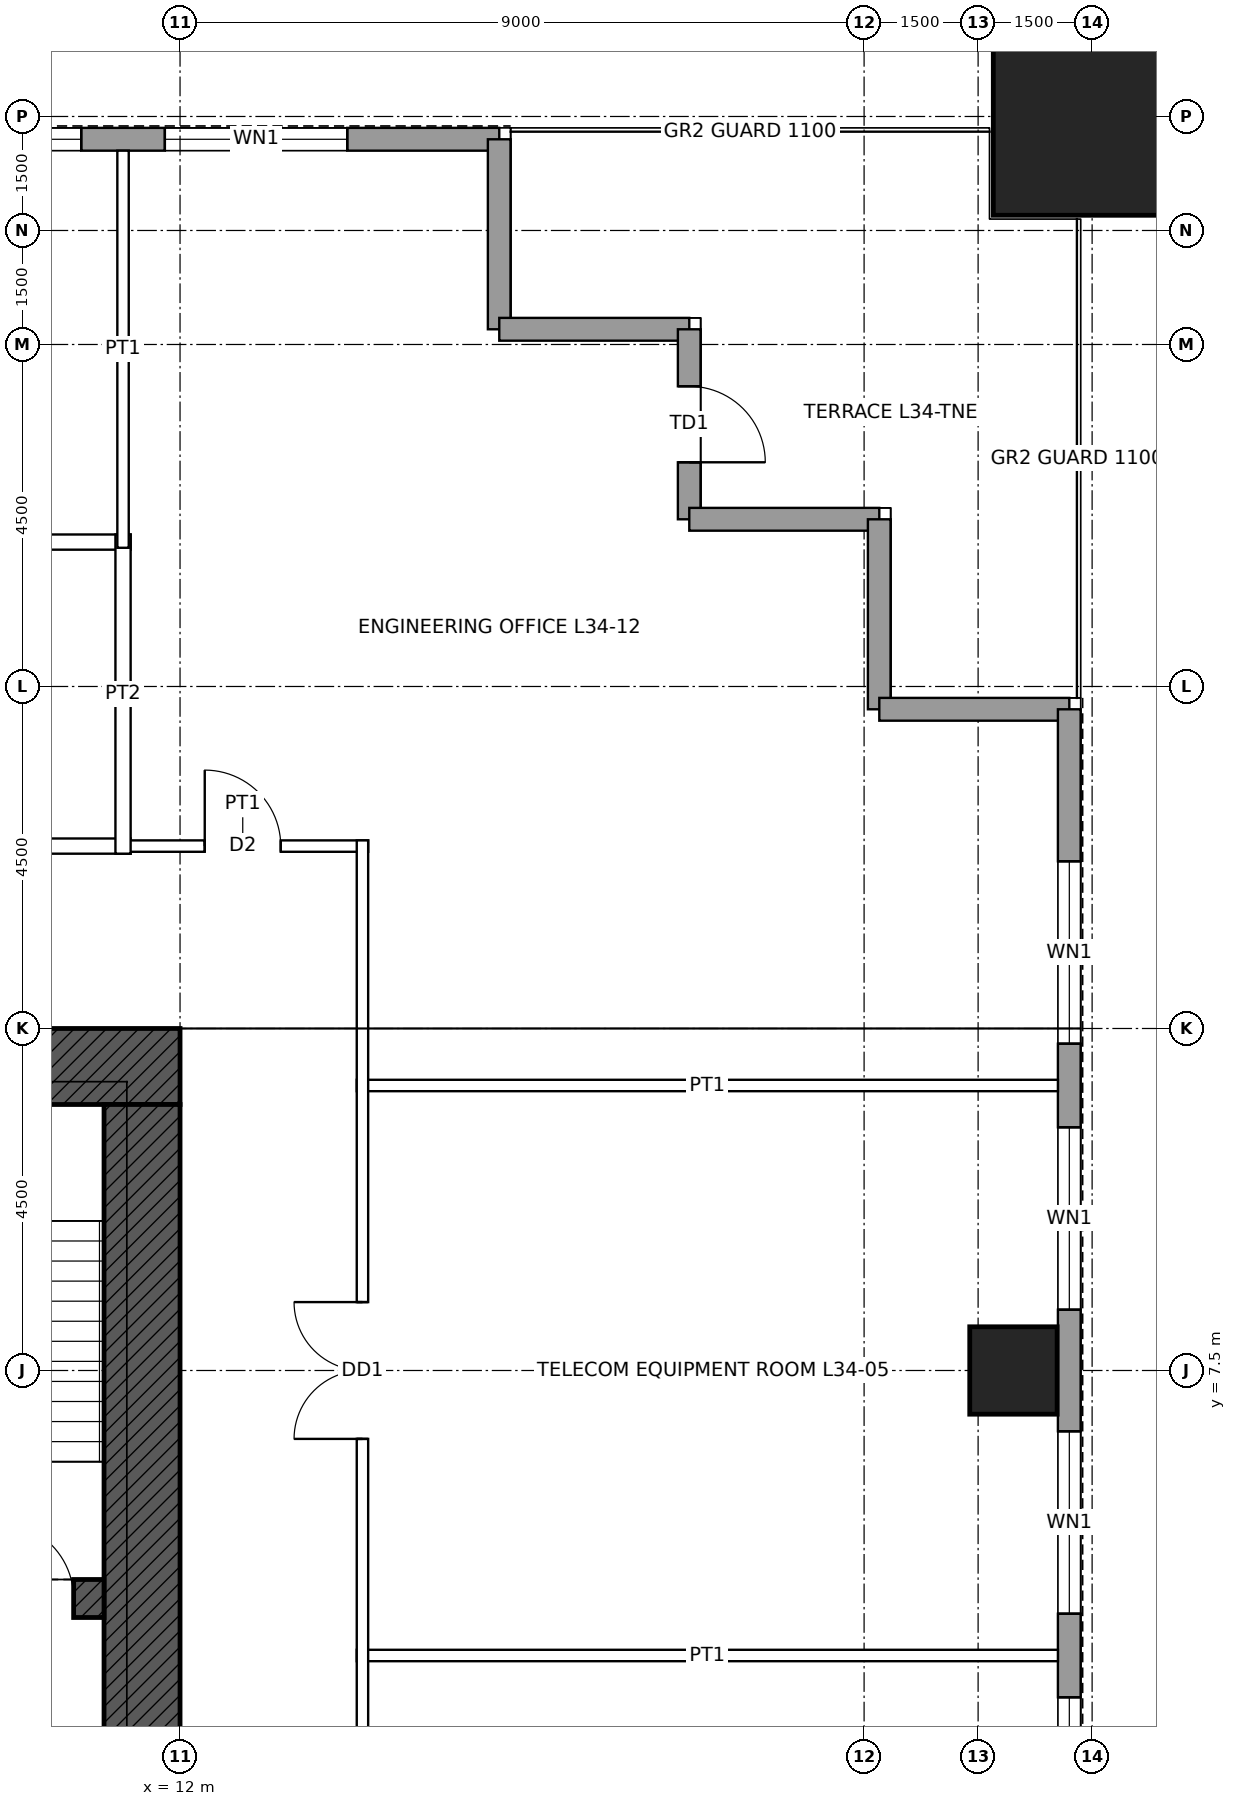
"""IFC4 building model, lengths in metres.
Left out: names, types, materials, properties, quantities, classifications, styles, units other than length and angle.
Written with IfcOpenShell. Run it as: python <this file> out.ifc"""

import sys

from ifc_helpers import new_model, si_unit, direction, frame, frame_2d, origin, origin_2d, place, context, subcontext, project, spatial, rectangle, hollow_rectangle, extrude, element, fill, save


model = new_model("IFC4")
c1 = context("Model", 3, precision=1e-05, world=origin(), true_north=direction((0.0, 1.0)))
c2 = subcontext(c1, "Body", "Model", "MODEL_VIEW")
j1 = project(units=[si_unit("LENGTHUNIT", "METRE"), si_unit("PLANEANGLEUNIT", "RADIAN")], contexts=[c1])
p1 = place(None, origin())
s1 = spatial("IfcSite", under=j1, at=p1, CompositionType="ELEMENT")
p2 = place(p1, origin())
s2 = spatial("IfcBuilding", under=s1, at=p2, CompositionType="ELEMENT")
p3 = place(p2, frame((0.0, 0.0, 167.4)))
s3 = spatial("IfcBuildingStorey", under=s2, at=p3, CompositionType="ELEMENT", Elevation=167.4)
p4 = place(p3, frame((24.0, 24.0, 0.0), z_axis=(0.0, 0.0, 1.0), x_axis=(1.0, 0.0, 0.0)))
e1 = element("IfcColumn", 1, at=p4, inside=s3, PredefinedType="COLUMN", context=c2, shape_type="SweptSolid", body=[
    extrude(hollow_rectangle(XDim=2.6, YDim=2.6, WallThickness=0.13, at=origin_2d()), origin(), (0.0, 0.0, 1.0), 4.5),
])
p5 = place(p3, frame((22.965, 7.5, 0.0), z_axis=(0.0, 0.0, 1.0), x_axis=(1.0, 0.0, 0.0)))
e2 = element("IfcColumn", 2, at=p5, inside=s3, PredefinedType="COLUMN", context=c2, shape_type="SweptSolid", body=[
    extrude(hollow_rectangle(XDim=1.15, YDim=1.15, WallThickness=0.075, at=origin_2d()), origin(), (0.0, 0.0, 1.0), 4.5),
])
p6 = place(p3, frame((-12.0, 11.5, 0.0), z_axis=(0.0, 0.0, 1.0), x_axis=(1.0, 0.0, 0.0)))
e3 = element("IfcWall", 3, at=p6, inside=s3, PredefinedType="SHEAR", context=c2, shape_type="SweptSolid", body=[
    extrude(rectangle(XDim=24.0, YDim=1.0, at=frame_2d((12.0, 0.0))), origin(), (0.0, 0.0, 1.0), 4.5),
])
p7 = place(p6, frame((6.25, 0.0, 0.0)))
e4 = element("IfcOpeningElement", 4, at=p7, cuts=e3, PredefinedType="OPENING", context=c2, shape_type="SweptSolid", body=[
    extrude(rectangle(XDim=1.0, YDim=2.4, at=frame_2d((0.5, 1.2))), frame((0.0, 0.51, 0.0), z_axis=(0.0, -1.0, 0.0), x_axis=(1.0, 0.0, 0.0)), (0.0, 0.0, 1.0), 1.02),
])
p8 = place(p6, frame((16.75, 0.0, 0.0)))
e5 = element("IfcOpeningElement", 5, at=p8, cuts=e3, PredefinedType="OPENING", context=c2, shape_type="SweptSolid", body=[
    extrude(rectangle(XDim=1.0, YDim=2.4, at=frame_2d((0.5, 1.2))), frame((0.0, 0.51, 0.0), z_axis=(0.0, -1.0, 0.0), x_axis=(1.0, 0.0, 0.0)), (0.0, 0.0, 1.0), 1.02),
])
p9 = place(p3, frame((11.5, 11.0, 0.0), z_axis=(0.0, 0.0, 1.0), x_axis=(0.0, -1.0, 0.0)))
e6 = element("IfcWall", 6, at=p9, inside=s3, PredefinedType="SHEAR", context=c2, shape_type="SweptSolid", body=[
    extrude(rectangle(XDim=22.0, YDim=1.0, at=frame_2d((11.0, 0.0))), origin(), (0.0, 0.0, 1.0), 4.5),
])
p10 = place(p9, frame((10.5, 0.0, 0.0)))
e7 = element("IfcOpeningElement", 7, at=p10, cuts=e6, PredefinedType="OPENING", context=c2, shape_type="SweptSolid", body=[
    extrude(rectangle(XDim=1.0, YDim=2.4, at=frame_2d((0.5, 1.2))), frame((0.0, 0.51, 0.0), z_axis=(0.0, -1.0, 0.0), x_axis=(1.0, 0.0, 0.0)), (0.0, 0.0, 1.0), 1.02),
])
p11 = place(p3, frame((-11.0, 4.5, 0.0), z_axis=(0.0, 0.0, 1.0), x_axis=(1.0, 0.0, 0.0)))
e8 = element("IfcWall", 8, at=p11, inside=s3, PredefinedType="SHEAR", context=c2, shape_type="SweptSolid", body=[
    extrude(rectangle(XDim=22.0, YDim=0.5, at=frame_2d((11.0, 0.0))), origin(), (0.0, 0.0, 1.0), 4.5),
])
p12 = place(p11, frame((0.4, 0.0, 0.0)))
e9 = element("IfcOpeningElement", 9, at=p12, cuts=e8, PredefinedType="OPENING", context=c2, shape_type="SweptSolid", body=[
    extrude(rectangle(XDim=1.0, YDim=2.1, at=frame_2d((0.5, 1.05))), frame((0.0, 0.26, 0.0), z_axis=(0.0, -1.0, 0.0), x_axis=(1.0, 0.0, 0.0)), (0.0, 0.0, 1.0), 0.52),
])
p13 = place(p11, frame((20.6, 0.0, 0.0)))
e10 = element("IfcOpeningElement", 10, at=p13, cuts=e8, PredefinedType="OPENING", context=c2, shape_type="SweptSolid", body=[
    extrude(rectangle(XDim=1.0, YDim=2.1, at=frame_2d((0.5, 1.05))), frame((0.0, 0.26, 0.0), z_axis=(0.0, -1.0, 0.0), x_axis=(1.0, 0.0, 0.0)), (0.0, 0.0, 1.0), 0.52),
])
p14 = place(p3, frame((-16.2, 23.7, 0.0), z_axis=(0.0, 0.0, 1.0), x_axis=(1.0, 0.0, 0.0)))
e11 = element("IfcWall", 11, at=p14, inside=s3, PredefinedType="SOLIDWALL", context=c2, shape_type="SweptSolid", body=[
    extrude(rectangle(XDim=32.4, YDim=0.3, at=frame_2d((16.2, 0.0))), origin(), (0.0, 0.0, 1.0), 4.25),
])
p15 = place(p14, frame((2.0, 0.0, 1.0)))
e12 = element("IfcOpeningElement", 12, at=p15, cuts=e11, PredefinedType="OPENING", context=c2, shape_type="SweptSolid", body=[
    extrude(rectangle(XDim=2.4, YDim=1.2, at=frame_2d((1.2, 0.6))), frame((0.0, 0.16, 0.0), z_axis=(0.0, -1.0, 0.0), x_axis=(1.0, 0.0, 0.0)), (0.0, 0.0, 1.0), 0.32),
])
p16 = place(p14, frame((5.5, 0.0, 1.0)))
e13 = element("IfcOpeningElement", 13, at=p16, cuts=e11, PredefinedType="OPENING", context=c2, shape_type="SweptSolid", body=[
    extrude(rectangle(XDim=2.4, YDim=1.2, at=frame_2d((1.2, 0.6))), frame((0.0, 0.16, 0.0), z_axis=(0.0, -1.0, 0.0), x_axis=(1.0, 0.0, 0.0)), (0.0, 0.0, 1.0), 0.32),
])
p17 = place(p14, frame((9.5, 0.0, 1.0)))
e14 = element("IfcOpeningElement", 14, at=p17, cuts=e11, PredefinedType="OPENING", context=c2, shape_type="SweptSolid", body=[
    extrude(rectangle(XDim=2.4, YDim=1.2, at=frame_2d((1.2, 0.6))), frame((0.0, 0.16, 0.0), z_axis=(0.0, -1.0, 0.0), x_axis=(1.0, 0.0, 0.0)), (0.0, 0.0, 1.0), 0.32),
])
p18 = place(p14, frame((13.0, 0.0, 1.0)))
e15 = element("IfcOpeningElement", 15, at=p18, cuts=e11, PredefinedType="OPENING", context=c2, shape_type="SweptSolid", body=[
    extrude(rectangle(XDim=2.4, YDim=1.2, at=frame_2d((1.2, 0.6))), frame((0.0, 0.16, 0.0), z_axis=(0.0, -1.0, 0.0), x_axis=(1.0, 0.0, 0.0)), (0.0, 0.0, 1.0), 0.32),
])
p19 = place(p14, frame((17.0, 0.0, 1.0)))
e16 = element("IfcOpeningElement", 16, at=p19, cuts=e11, PredefinedType="OPENING", context=c2, shape_type="SweptSolid", body=[
    extrude(rectangle(XDim=2.4, YDim=1.2, at=frame_2d((1.2, 0.6))), frame((0.0, 0.16, 0.0), z_axis=(0.0, -1.0, 0.0), x_axis=(1.0, 0.0, 0.0)), (0.0, 0.0, 1.0), 0.32),
])
p20 = place(p14, frame((20.5, 0.0, 1.0)))
e17 = element("IfcOpeningElement", 17, at=p20, cuts=e11, PredefinedType="OPENING", context=c2, shape_type="SweptSolid", body=[
    extrude(rectangle(XDim=2.4, YDim=1.2, at=frame_2d((1.2, 0.6))), frame((0.0, 0.16, 0.0), z_axis=(0.0, -1.0, 0.0), x_axis=(1.0, 0.0, 0.0)), (0.0, 0.0, 1.0), 0.32),
])
p21 = place(p14, frame((24.5, 0.0, 1.0)))
e18 = element("IfcOpeningElement", 18, at=p21, cuts=e11, PredefinedType="OPENING", context=c2, shape_type="SweptSolid", body=[
    extrude(rectangle(XDim=2.4, YDim=1.2, at=frame_2d((1.2, 0.6))), frame((0.0, 0.16, 0.0), z_axis=(0.0, -1.0, 0.0), x_axis=(1.0, 0.0, 0.0)), (0.0, 0.0, 1.0), 0.32),
])
p22 = place(p14, frame((28.0, 0.0, 1.0)))
e19 = element("IfcOpeningElement", 19, at=p22, cuts=e11, PredefinedType="OPENING", context=c2, shape_type="SweptSolid", body=[
    extrude(rectangle(XDim=2.4, YDim=1.2, at=frame_2d((1.2, 0.6))), frame((0.0, 0.16, 0.0), z_axis=(0.0, -1.0, 0.0), x_axis=(1.0, 0.0, 0.0)), (0.0, 0.0, 1.0), 0.32),
])
for number, where, z_axis, x_axis in (
    (20, (16.2, 23.7, 0.0), (0.0, 0.0, 1.0), (0.0, -1.0, 0.0)),
    (21, (16.2, 21.2, 0.0), (0.0, 0.0, 1.0), (1.0, 0.0, 0.0)),
):
    element("IfcWall", number, at=place(p3, frame(where, z_axis=z_axis, x_axis=x_axis)), inside=s3, PredefinedType="SOLIDWALL", context=c2, shape_type="SweptSolid", body=[
        extrude(rectangle(XDim=2.5, YDim=0.3, at=frame_2d((1.25, 0.0))), origin(), (0.0, 0.0, 1.0), 4.25),
    ])
p23 = place(p3, frame((18.7, 21.2, 0.0), z_axis=(0.0, 0.0, 1.0), x_axis=(0.0, -1.0, 0.0)))
e22 = element("IfcWall", 22, at=p23, inside=s3, PredefinedType="SOLIDWALL", context=c2, shape_type="SweptSolid", body=[
    extrude(rectangle(XDim=2.5, YDim=0.3, at=frame_2d((1.25, 0.0))), origin(), (0.0, 0.0, 1.0), 4.25),
])
p24 = place(p23, frame((0.75, 0.0, 0.0)))
e23 = element("IfcOpeningElement", 23, at=p24, cuts=e22, PredefinedType="OPENING", context=c2, shape_type="SweptSolid", body=[
    extrude(rectangle(XDim=1.0, YDim=2.4, at=frame_2d((0.5, 1.2))), frame((0.0, 0.16, 0.0), z_axis=(0.0, -1.0, 0.0), x_axis=(1.0, 0.0, 0.0)), (0.0, 0.0, 1.0), 0.32),
])
for number, where, z_axis, x_axis in (
    (24, (18.7, 18.7, 0.0), (0.0, 0.0, 1.0), (1.0, 0.0, 0.0)),
    (25, (21.2, 18.7, 0.0), (0.0, 0.0, 1.0), (0.0, -1.0, 0.0)),
    (26, (21.2, 16.2, 0.0), (0.0, 0.0, 1.0), (1.0, 0.0, 0.0)),
):
    element("IfcWall", number, at=place(p3, frame(where, z_axis=z_axis, x_axis=x_axis)), inside=s3, PredefinedType="SOLIDWALL", context=c2, shape_type="SweptSolid", body=[
        extrude(rectangle(XDim=2.5, YDim=0.3, at=frame_2d((1.25, 0.0))), origin(), (0.0, 0.0, 1.0), 4.25),
    ])
p25 = place(p3, frame((23.7, 16.2, 0.0), z_axis=(0.0, 0.0, 1.0), x_axis=(0.0, -1.0, 0.0)))
e27 = element("IfcWall", 27, at=p25, inside=s3, PredefinedType="SOLIDWALL", context=c2, shape_type="SweptSolid", body=[
    extrude(rectangle(XDim=32.4, YDim=0.3, at=frame_2d((16.2, 0.0))), origin(), (0.0, 0.0, 1.0), 4.25),
])
p26 = place(p25, frame((2.0, 0.0, 1.0)))
e28 = element("IfcOpeningElement", 28, at=p26, cuts=e27, PredefinedType="OPENING", context=c2, shape_type="SweptSolid", body=[
    extrude(rectangle(XDim=2.4, YDim=1.2, at=frame_2d((1.2, 0.6))), frame((0.0, 0.16, 0.0), z_axis=(0.0, -1.0, 0.0), x_axis=(1.0, 0.0, 0.0)), (0.0, 0.0, 1.0), 0.32),
])
p27 = place(p25, frame((5.5, 0.0, 1.0)))
e29 = element("IfcOpeningElement", 29, at=p27, cuts=e27, PredefinedType="OPENING", context=c2, shape_type="SweptSolid", body=[
    extrude(rectangle(XDim=2.4, YDim=1.2, at=frame_2d((1.2, 0.6))), frame((0.0, 0.16, 0.0), z_axis=(0.0, -1.0, 0.0), x_axis=(1.0, 0.0, 0.0)), (0.0, 0.0, 1.0), 0.32),
])
p28 = place(p25, frame((9.5, 0.0, 1.0)))
e30 = element("IfcOpeningElement", 30, at=p28, cuts=e27, PredefinedType="OPENING", context=c2, shape_type="SweptSolid", body=[
    extrude(rectangle(XDim=2.4, YDim=1.2, at=frame_2d((1.2, 0.6))), frame((0.0, 0.16, 0.0), z_axis=(0.0, -1.0, 0.0), x_axis=(1.0, 0.0, 0.0)), (0.0, 0.0, 1.0), 0.32),
])
p29 = place(p25, frame((13.0, 0.0, 1.0)))
e31 = element("IfcOpeningElement", 31, at=p29, cuts=e27, PredefinedType="OPENING", context=c2, shape_type="SweptSolid", body=[
    extrude(rectangle(XDim=2.4, YDim=1.2, at=frame_2d((1.2, 0.6))), frame((0.0, 0.16, 0.0), z_axis=(0.0, -1.0, 0.0), x_axis=(1.0, 0.0, 0.0)), (0.0, 0.0, 1.0), 0.32),
])
p30 = place(p25, frame((17.0, 0.0, 1.0)))
e32 = element("IfcOpeningElement", 32, at=p30, cuts=e27, PredefinedType="OPENING", context=c2, shape_type="SweptSolid", body=[
    extrude(rectangle(XDim=2.4, YDim=1.2, at=frame_2d((1.2, 0.6))), frame((0.0, 0.16, 0.0), z_axis=(0.0, -1.0, 0.0), x_axis=(1.0, 0.0, 0.0)), (0.0, 0.0, 1.0), 0.32),
])
p31 = place(p25, frame((20.5, 0.0, 1.0)))
e33 = element("IfcOpeningElement", 33, at=p31, cuts=e27, PredefinedType="OPENING", context=c2, shape_type="SweptSolid", body=[
    extrude(rectangle(XDim=2.4, YDim=1.2, at=frame_2d((1.2, 0.6))), frame((0.0, 0.16, 0.0), z_axis=(0.0, -1.0, 0.0), x_axis=(1.0, 0.0, 0.0)), (0.0, 0.0, 1.0), 0.32),
])
p32 = place(p25, frame((24.5, 0.0, 1.0)))
e34 = element("IfcOpeningElement", 34, at=p32, cuts=e27, PredefinedType="OPENING", context=c2, shape_type="SweptSolid", body=[
    extrude(rectangle(XDim=2.4, YDim=1.2, at=frame_2d((1.2, 0.6))), frame((0.0, 0.16, 0.0), z_axis=(0.0, -1.0, 0.0), x_axis=(1.0, 0.0, 0.0)), (0.0, 0.0, 1.0), 0.32),
])
p33 = place(p25, frame((28.0, 0.0, 1.0)))
e35 = element("IfcOpeningElement", 35, at=p33, cuts=e27, PredefinedType="OPENING", context=c2, shape_type="SweptSolid", body=[
    extrude(rectangle(XDim=2.4, YDim=1.2, at=frame_2d((1.2, 0.6))), frame((0.0, 0.16, 0.0), z_axis=(0.0, -1.0, 0.0), x_axis=(1.0, 0.0, 0.0)), (0.0, 0.0, 1.0), 0.32),
])
for number, where, z_axis, x_axis in (
    (36, (14.325, 3.75, 0.0), (0.0, 0.0, 1.0), (1.0, 0.0, 0.0)),
    (37, (14.325, 11.25, 0.0), (0.0, 0.0, 1.0), (1.0, 0.0, 0.0)),
):
    element("IfcWall", number, at=place(p3, frame(where, z_axis=z_axis, x_axis=x_axis)), inside=s3, PredefinedType="PARTITIONING", context=c2, shape_type="SweptSolid", body=[
        extrude(rectangle(XDim=9.225, YDim=0.15, at=frame_2d((4.613, 0.0))), origin(), (0.0, 0.0, 1.0), 3.409),
    ])
p34 = place(p3, frame((3.65, 14.4, 0.0), z_axis=(0.0, 0.0, 1.0), x_axis=(1.0, 0.0, 0.0)))
e38 = element("IfcWall", 38, at=p34, inside=s3, PredefinedType="PARTITIONING", context=c2, shape_type="SweptSolid", body=[
    extrude(rectangle(XDim=7.7, YDim=0.2, at=frame_2d((3.85, 0.0))), origin(), (0.0, 0.0, 1.0), 4.25),
])
p35 = place(p3, frame((11.175, 14.4, 0.0), z_axis=(0.0, 0.0, 1.0), x_axis=(1.0, 0.0, 0.0)))
e39 = element("IfcWall", 39, at=p35, inside=s3, PredefinedType="PARTITIONING", context=c2, shape_type="SweptSolid", body=[
    extrude(rectangle(XDim=3.3, YDim=0.15, at=frame_2d((1.65, 0.0))), origin(), (0.0, 0.0, 1.0), 4.25),
])
p36 = place(p35, frame((1.15, 0.0, 0.0)))
e40 = element("IfcOpeningElement", 40, at=p36, cuts=e39, PredefinedType="OPENING", context=c2, shape_type="SweptSolid", body=[
    extrude(rectangle(XDim=1.0, YDim=2.1, at=frame_2d((0.5, 1.05))), frame((0.0, 0.085, 0.0), z_axis=(0.0, -1.0, 0.0), x_axis=(1.0, 0.0, 0.0)), (0.0, 0.0, 1.0), 0.17),
])
p37 = place(p3, frame((3.65, 18.4, 0.0), z_axis=(0.0, 0.0, 1.0), x_axis=(1.0, 0.0, 0.0)))
e41 = element("IfcWall", 41, at=p37, inside=s3, PredefinedType="PARTITIONING", context=c2, shape_type="SweptSolid", body=[
    extrude(rectangle(XDim=7.7, YDim=0.2, at=frame_2d((3.85, 0.0))), origin(), (0.0, 0.0, 1.0), 4.25),
])
p38 = place(p3, frame((11.25, 14.3, 0.0), z_axis=(0.0, 0.0, 1.0), x_axis=(0.0, 1.0, 0.0)))
e42 = element("IfcWall", 42, at=p38, inside=s3, PredefinedType="PARTITIONING", context=c2, shape_type="SweptSolid", body=[
    extrude(rectangle(XDim=4.2, YDim=0.2, at=frame_2d((2.1, 0.0))), origin(), (0.0, 0.0, 1.0), 3.409),
])
p39 = place(p3, frame((11.25, 18.325, 0.0), z_axis=(0.0, 0.0, 1.0), x_axis=(0.0, 1.0, 0.0)))
e43 = element("IfcWall", 43, at=p39, inside=s3, PredefinedType="PARTITIONING", context=c2, shape_type="SweptSolid", body=[
    extrude(rectangle(XDim=5.225, YDim=0.15, at=frame_2d((2.613, 0.0))), origin(), (0.0, 0.0, 1.0), 3.409),
])
p40 = place(p3, frame((14.4, -14.475, 0.0), z_axis=(0.0, 0.0, 1.0), x_axis=(0.0, 1.0, 0.0)))
e44 = element("IfcWall", 44, at=p40, inside=s3, PredefinedType="PARTITIONING", context=c2, shape_type="SweptSolid", body=[
    extrude(rectangle(XDim=28.95, YDim=0.15, at=frame_2d((14.475, 0.0))), origin(), (0.0, 0.0, 1.0), 4.25),
])
p41 = place(p40, frame((21.075, 0.0, 0.0)))
e45 = element("IfcOpeningElement", 45, at=p41, cuts=e44, PredefinedType="OPENING", context=c2, shape_type="SweptSolid", body=[
    extrude(rectangle(XDim=1.8, YDim=2.4, at=frame_2d((0.9, 1.2))), frame((0.0, 0.085, 0.0), z_axis=(0.0, -1.0, 0.0), x_axis=(1.0, 0.0, 0.0)), (0.0, 0.0, 1.0), 0.17),
])
p42 = place(p40, frame((9.825, 0.0, 0.0)))
e46 = element("IfcOpeningElement", 46, at=p42, cuts=e44, PredefinedType="OPENING", context=c2, shape_type="SweptSolid", body=[
    extrude(rectangle(XDim=1.8, YDim=2.4, at=frame_2d((0.9, 1.2))), frame((0.0, 0.085, 0.0), z_axis=(0.0, -1.0, 0.0), x_axis=(1.0, 0.0, 0.0)), (0.0, 0.0, 1.0), 0.17),
])
p43 = place(p21, origin())
e47 = element("IfcWindow", 47, at=p43, inside=s3, PartitioningType="SINGLE_PANEL", PredefinedType="WINDOW", context=c2, shape_type="SweptSolid", body=[
    extrude(rectangle(XDim=2.4, YDim=1.2, at=frame_2d((1.2, 0.6))), frame((0.0, 0.03, 0.0), z_axis=(0.0, -1.0, 0.0), x_axis=(1.0, 0.0, 0.0)), (0.0, 0.0, 1.0), 0.06),
])
fill(e18, e47)
p44 = place(p22, origin())
e48 = element("IfcWindow", 48, at=p44, inside=s3, PartitioningType="SINGLE_PANEL", PredefinedType="WINDOW", context=c2, shape_type="SweptSolid", body=[
    extrude(rectangle(XDim=2.4, YDim=1.2, at=frame_2d((1.2, 0.6))), frame((0.0, 0.03, 0.0), z_axis=(0.0, -1.0, 0.0), x_axis=(1.0, 0.0, 0.0)), (0.0, 0.0, 1.0), 0.06),
])
fill(e19, e48)
p45 = place(p24, origin())
e49 = element("IfcDoor", 49, at=p45, inside=s3, OperationType="SINGLE_SWING_RIGHT", PredefinedType="DOOR", context=c2, shape_type="SweptSolid", body=[
    extrude(rectangle(XDim=1.0, YDim=2.4, at=frame_2d((0.5, 1.2))), frame((0.0, 0.025, 0.0), z_axis=(0.0, -1.0, 0.0), x_axis=(1.0, 0.0, 0.0)), (0.0, 0.0, 1.0), 0.05),
])
fill(e23, e49)
p46 = place(p26, origin())
e50 = element("IfcWindow", 50, at=p46, inside=s3, PartitioningType="SINGLE_PANEL", PredefinedType="WINDOW", context=c2, shape_type="SweptSolid", body=[
    extrude(rectangle(XDim=2.4, YDim=1.2, at=frame_2d((1.2, 0.6))), frame((0.0, 0.03, 0.0), z_axis=(0.0, -1.0, 0.0), x_axis=(1.0, 0.0, 0.0)), (0.0, 0.0, 1.0), 0.06),
])
fill(e28, e50)
p47 = place(p27, origin())
e51 = element("IfcWindow", 51, at=p47, inside=s3, PartitioningType="SINGLE_PANEL", PredefinedType="WINDOW", context=c2, shape_type="SweptSolid", body=[
    extrude(rectangle(XDim=2.4, YDim=1.2, at=frame_2d((1.2, 0.6))), frame((0.0, 0.03, 0.0), z_axis=(0.0, -1.0, 0.0), x_axis=(1.0, 0.0, 0.0)), (0.0, 0.0, 1.0), 0.06),
])
fill(e29, e51)
p48 = place(p28, origin())
e52 = element("IfcWindow", 52, at=p48, inside=s3, PartitioningType="SINGLE_PANEL", PredefinedType="WINDOW", context=c2, shape_type="SweptSolid", body=[
    extrude(rectangle(XDim=2.4, YDim=1.2, at=frame_2d((1.2, 0.6))), frame((0.0, 0.03, 0.0), z_axis=(0.0, -1.0, 0.0), x_axis=(1.0, 0.0, 0.0)), (0.0, 0.0, 1.0), 0.06),
])
fill(e30, e52)
p49 = place(p29, origin())
e53 = element("IfcWindow", 53, at=p49, inside=s3, PartitioningType="SINGLE_PANEL", PredefinedType="WINDOW", context=c2, shape_type="SweptSolid", body=[
    extrude(rectangle(XDim=2.4, YDim=1.2, at=frame_2d((1.2, 0.6))), frame((0.0, 0.03, 0.0), z_axis=(0.0, -1.0, 0.0), x_axis=(1.0, 0.0, 0.0)), (0.0, 0.0, 1.0), 0.06),
])
fill(e31, e53)
p50 = place(p13, origin())
e54 = element("IfcDoor", 54, at=p50, inside=s3, OperationType="SINGLE_SWING_LEFT", PredefinedType="DOOR", context=c2, shape_type="SweptSolid", body=[
    extrude(rectangle(XDim=1.0, YDim=2.1, at=frame_2d((0.5, 1.05))), frame((0.0, 0.025, 0.0), z_axis=(0.0, -1.0, 0.0), x_axis=(1.0, 0.0, 0.0)), (0.0, 0.0, 1.0), 0.05),
])
fill(e10, e54)
p51 = place(p41, origin())
e55 = element("IfcDoor", 55, at=p51, inside=s3, OperationType="DOUBLE_DOOR_SINGLE_SWING", PredefinedType="DOOR", context=c2, shape_type="SweptSolid", body=[
    extrude(rectangle(XDim=1.8, YDim=2.4, at=frame_2d((0.9, 1.2))), frame((0.0, 0.025, 0.0), z_axis=(0.0, -1.0, 0.0), x_axis=(1.0, 0.0, 0.0)), (0.0, 0.0, 1.0), 0.05),
])
fill(e45, e55)
p52 = place(p36, origin())
e56 = element("IfcDoor", 56, at=p52, inside=s3, OperationType="SINGLE_SWING_LEFT", PredefinedType="DOOR", context=c2, shape_type="SweptSolid", body=[
    extrude(rectangle(XDim=1.0, YDim=2.1, at=frame_2d((0.5, 1.05))), frame((0.0, 0.025, 0.0), z_axis=(0.0, -1.0, 0.0), x_axis=(1.0, 0.0, 0.0)), (0.0, 0.0, 1.0), 0.05),
])
fill(e40, e56)
save(model, sys.argv[1])
